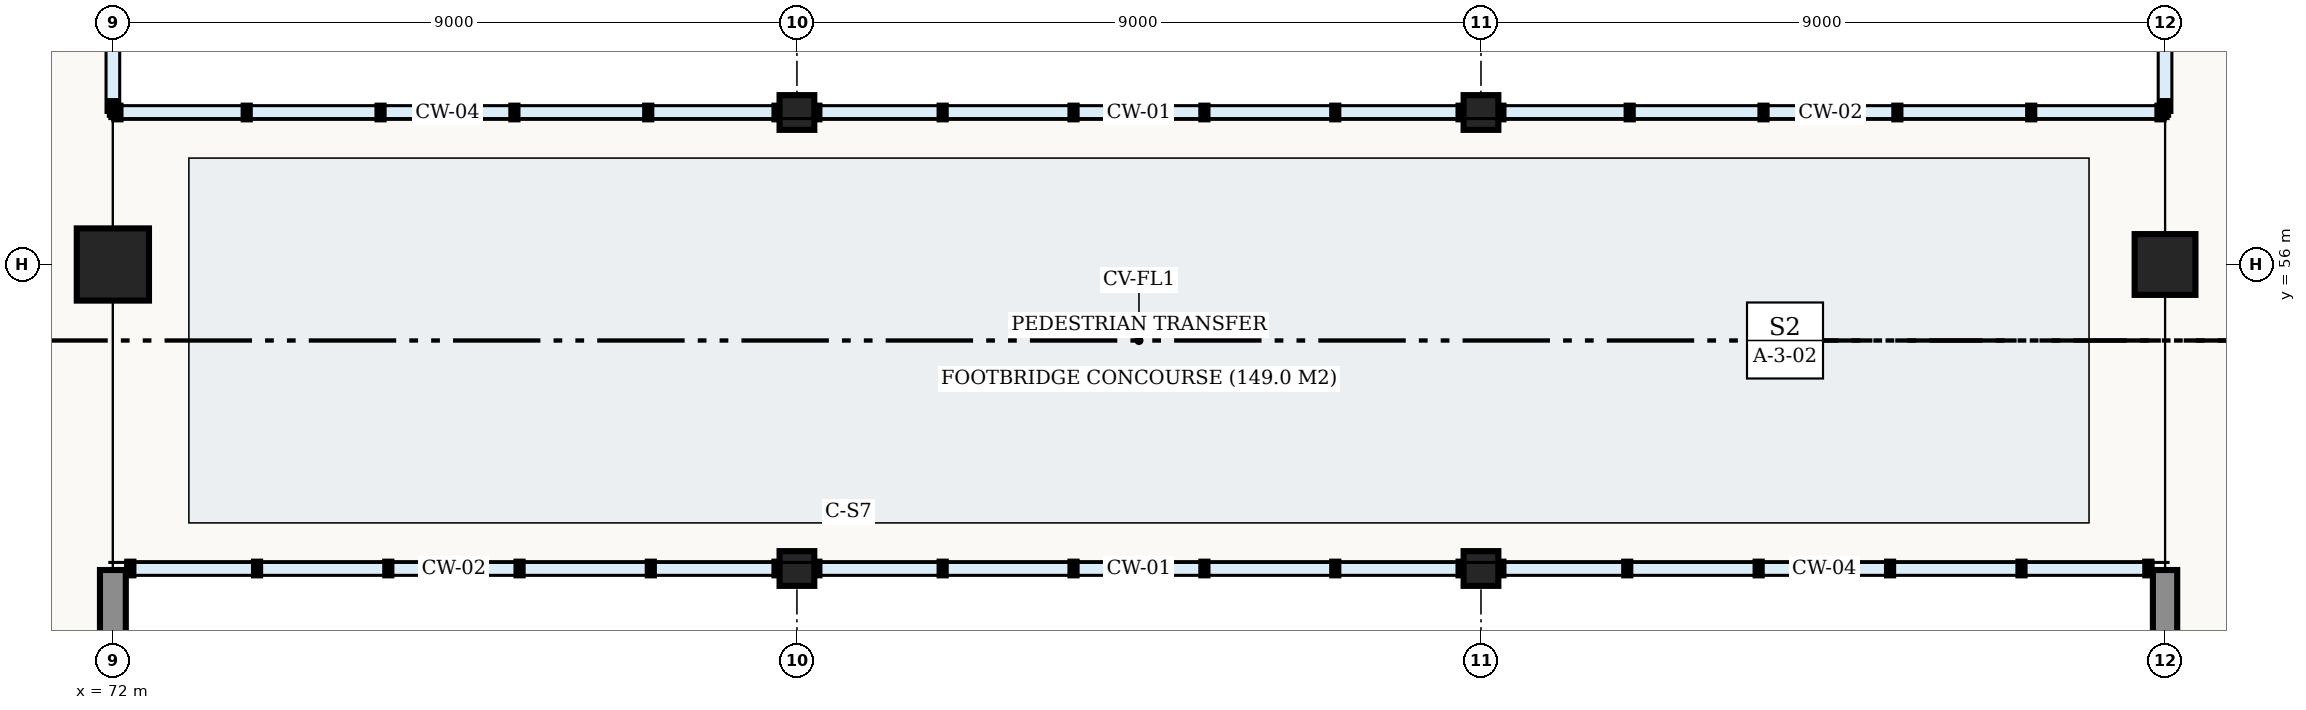
"""IFC4 building model, lengths in metres.
Left out: names, types, materials, properties, quantities, classifications, styles, units other than length and angle.
Written with IfcOpenShell. Run it as: python <this file> out.ifc"""

import sys

from ifc_helpers import new_model, si_unit, direction, frame, frame_2d, origin, origin_2d, place, context, subcontext, project, spatial, rectangle, circle, hollow_circle, extrude, element, save


model = new_model("IFC4")
c1 = context("Model", 3, precision=1e-05, world=origin(), true_north=direction((0.0, 1.0)))
c2 = subcontext(c1, "Body", "Model", "MODEL_VIEW")
j1 = project(units=[si_unit("LENGTHUNIT", "METRE"), si_unit("PLANEANGLEUNIT", "RADIAN")], contexts=[c1])
p1 = place(None, origin())
s1 = spatial("IfcSite", under=j1, at=p1, CompositionType="ELEMENT")
p2 = place(p1, origin())
s2 = spatial("IfcBuilding", under=s1, at=p2, CompositionType="ELEMENT")
p3 = place(p2, frame((0.0, 0.0, 5.4)))
s3 = spatial("IfcBuildingStorey", under=s2, at=p3, CompositionType="ELEMENT", Elevation=5.4)
p4 = place(p3, frame((72.0, 56.0, 0.0), z_axis=(0.0, 0.0, 1.0), x_axis=(1.0, 0.0, 0.0)))
e1 = element("IfcColumn", 1, at=p4, inside=s3, PredefinedType="COLUMN", context=c2, shape_type="SweptSolid", body=[
    extrude(circle(Radius=0.475, at=origin_2d()), origin(), (0.0, 0.0, 1.0), 4.8),
])
p5 = place(p3, frame((99.0, 56.0, 0.0), z_axis=(0.0, 0.0, 1.0), x_axis=(1.0, 0.0, 0.0)))
e2 = element("IfcColumn", 2, at=p5, inside=s3, PredefinedType="COLUMN", context=c2, shape_type="SweptSolid", body=[
    extrude(rectangle(XDim=0.8, YDim=0.8, at=origin_2d()), origin(), (0.0, 0.0, 1.0), 4.8),
])
for number, where, z_axis, x_axis in (
    (3, (81.0, 52.0, 0.0), (0.0, 0.0, 1.0), (1.0, 0.0, 0.0)),
    (4, (81.0, 58.0, 0.0), (0.0, 0.0, 1.0), (1.0, 0.0, 0.0)),
    (5, (90.0, 52.0, 0.0), (0.0, 0.0, 1.0), (1.0, 0.0, 0.0)),
    (6, (90.0, 58.0, 0.0), (0.0, 0.0, 1.0), (1.0, 0.0, 0.0)),
):
    element("IfcColumn", number, at=place(p3, frame(where, z_axis=z_axis, x_axis=x_axis)), inside=s3, PredefinedType="COLUMN", context=c2, shape_type="SweptSolid", body=[
        extrude(hollow_circle(Radius=0.229, WallThickness=0.016, at=origin_2d()), origin(), (0.0, 0.0, 1.0), 4.8),
    ])
p6 = place(p3, frame((99.0, 48.398, 0.0), z_axis=(0.0, 0.0, 1.0), x_axis=(0.0, 1.0, 0.0)))
e7 = element("IfcWall", 7, at=p6, inside=s3, PredefinedType="STANDARD", context=c2, shape_type="SweptSolid", body=[
    extrude(rectangle(XDim=3.582, YDim=0.32, at=frame_2d((1.791, 0.0))), origin(), (0.0, 0.0, 1.0), 3.31),
])
p7 = place(p6, frame((1.116, 0.0, 0.9)))
e8 = element("IfcOpeningElement", 8, at=p7, cuts=e7, PredefinedType="OPENING", context=c2, shape_type="SweptSolid", body=[
    extrude(rectangle(XDim=1.35, YDim=2.0, at=frame_2d((0.675, 1.0))), frame((0.0, 0.172, 0.0), z_axis=(0.0, -1.0, 0.0), x_axis=(1.0, 0.0, 0.0)), (0.0, 0.0, 1.0), 0.344),
])
p8 = place(p3, frame((72.0, 51.98, 0.0), z_axis=(0.0, 0.0, 1.0), x_axis=(0.0, -1.0, 0.0)))
e9 = element("IfcWall", 9, at=p8, inside=s3, PredefinedType="STANDARD", context=c2, shape_type="SweptSolid", body=[
    extrude(rectangle(XDim=3.508, YDim=0.34, at=frame_2d((1.754, 0.0))), origin(), (0.0, 0.0, 1.0), 3.26),
])
p9 = place(p8, frame((0.954, 0.0, 0.75)))
e10 = element("IfcOpeningElement", 10, at=p9, cuts=e9, PredefinedType="OPENING", context=c2, shape_type="SweptSolid", body=[
    extrude(rectangle(XDim=1.6, YDim=2.2, at=frame_2d((0.8, 1.1))), frame((0.0, 0.182, 0.0), z_axis=(0.0, -1.0, 0.0), x_axis=(1.0, 0.0, 0.0)), (0.0, 0.0, 1.0), 0.364),
])
save(model, sys.argv[1])
